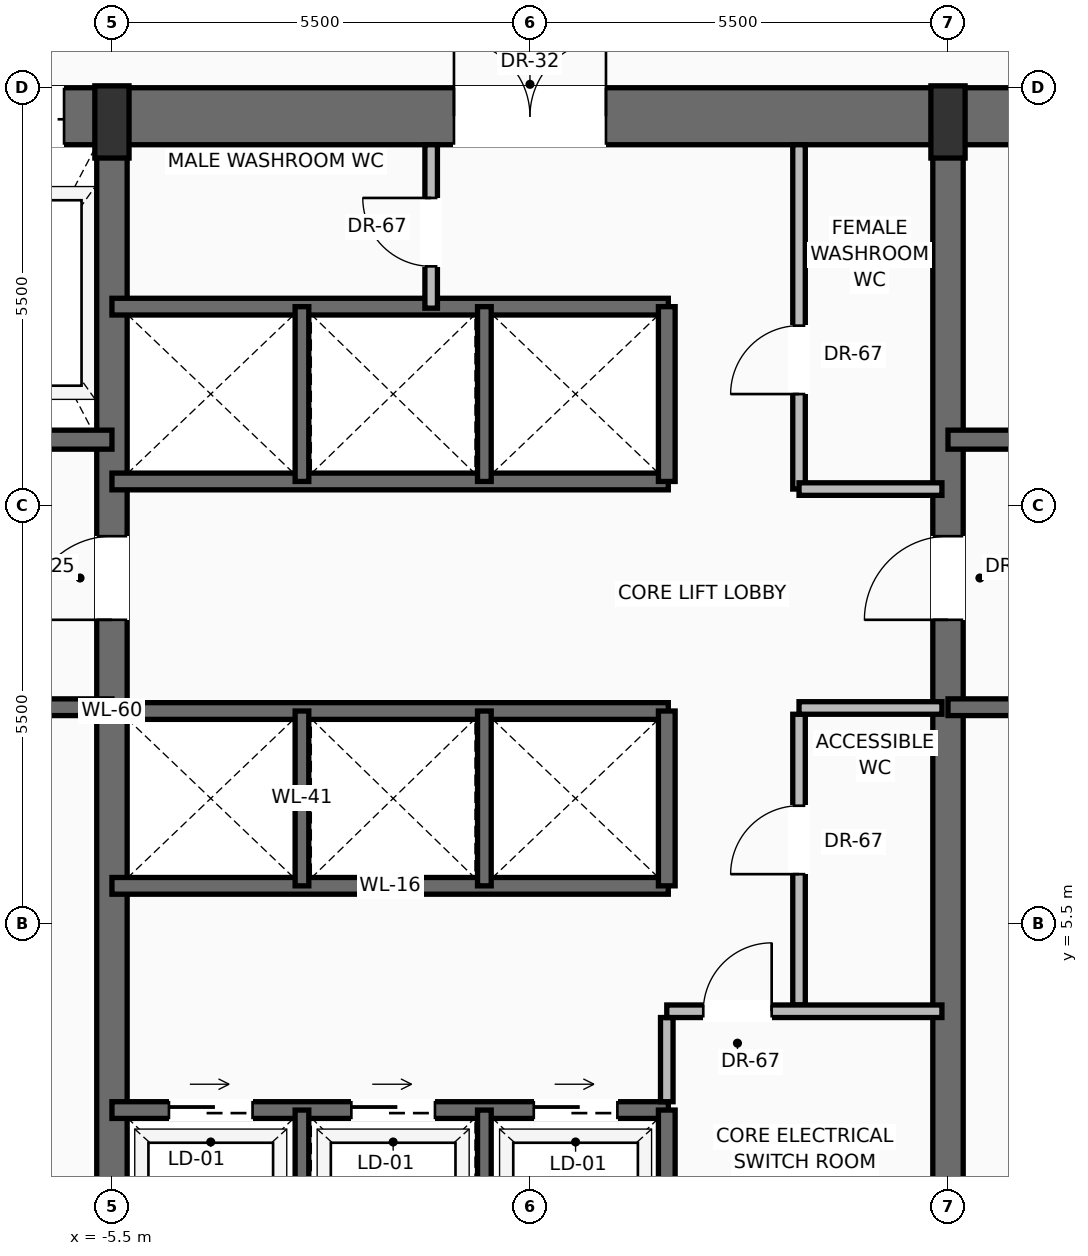
"""IFC4 building model, lengths in metres.
Left out: names, types, materials, properties, quantities, classifications, styles, units other than length and angle.
Written with IfcOpenShell. Run it as: python <this file> out.ifc"""

import sys

from ifc_helpers import new_model, si_unit, direction, frame, frame_2d, origin, origin_2d, place, context, subcontext, project, spatial, rectangle, extrude, source, transform, mapped, element, fill, save


model = new_model("IFC4")
c1 = context("Model", 3, precision=1e-05, world=origin(), true_north=direction((0.0, 1.0)))
c2 = subcontext(c1, "Body", "Model", "MODEL_VIEW")
j1 = project(units=[si_unit("LENGTHUNIT", "METRE"), si_unit("PLANEANGLEUNIT", "RADIAN")], contexts=[c1])
p1 = place(None, origin())
s1 = spatial("IfcSite", under=j1, at=p1, CompositionType="ELEMENT")
p2 = place(p1, origin())
s2 = spatial("IfcBuilding", under=s1, at=p2, CompositionType="ELEMENT")
p3 = place(p2, frame((0.0, 0.0, 95.1)))
s3 = spatial("IfcBuildingStorey", under=s2, at=p3, CompositionType="ELEMENT", Elevation=95.1)
p4 = place(p3, frame((-10.9, 16.125, 0.0), z_axis=(0.0, 0.0, 1.0), x_axis=(1.0, 0.0, 0.0)))
e1 = element("IfcWall", 1, at=p4, inside=s3, PredefinedType="SHEAR", context=c2, shape_type="SweptSolid", body=[
    extrude(rectangle(XDim=21.8, YDim=0.75, at=frame_2d((10.9, 0.0))), origin(), (0.0, 0.0, 1.0), 3.45),
])
p5 = place(p4, frame((3.47, 0.0, 0.0)))
e2 = element("IfcOpeningElement", 2, at=p5, cuts=e1, PredefinedType="OPENING", context=c2, shape_type="SweptSolid", body=[
    extrude(rectangle(XDim=1.3, YDim=2.3, at=frame_2d((0.65, 1.15))), frame((0.0, 0.385, 0.0), z_axis=(0.0, -1.0, 0.0), x_axis=(1.0, 0.0, 0.0)), (0.0, 0.0, 1.0), 0.77),
])
p6 = place(p4, frame((9.9, 0.0, 0.0)))
e3 = element("IfcOpeningElement", 3, at=p6, cuts=e1, PredefinedType="OPENING", context=c2, shape_type="SweptSolid", body=[
    extrude(rectangle(XDim=2.0, YDim=2.4, at=frame_2d((1.0, 1.2))), frame((0.0, 0.385, 0.0), z_axis=(0.0, -1.0, 0.0), x_axis=(1.0, 0.0, 0.0)), (0.0, 0.0, 1.0), 0.77),
])
p7 = place(p3, frame((-5.5, 0.475, 0.0), z_axis=(0.0, 0.0, 1.0), x_axis=(0.0, 1.0, 0.0)))
e4 = element("IfcWall", 4, at=p7, inside=s3, PredefinedType="SHEAR", context=c2, shape_type="SweptSolid", body=[
    extrude(rectangle(XDim=15.65, YDim=0.4, at=frame_2d((7.825, 0.0))), origin(), (0.0, 0.0, 1.0), 3.45),
])
p8 = place(p7, frame((9.025, 0.0, 0.0)))
e5 = element("IfcOpeningElement", 5, at=p8, cuts=e4, PredefinedType="OPENING", context=c2, shape_type="SweptSolid", body=[
    extrude(rectangle(XDim=1.1, YDim=2.2, at=frame_2d((0.55, 1.1))), frame((0.0, 0.21, 0.0), z_axis=(0.0, -1.0, 0.0), x_axis=(1.0, 0.0, 0.0)), (0.0, 0.0, 1.0), 0.42),
])
p9 = place(p3, frame((5.5, 0.475, 0.0), z_axis=(0.0, 0.0, 1.0), x_axis=(0.0, 1.0, 0.0)))
e6 = element("IfcWall", 6, at=p9, inside=s3, PredefinedType="SHEAR", context=c2, shape_type="SweptSolid", body=[
    extrude(rectangle(XDim=15.65, YDim=0.4, at=frame_2d((7.825, 0.0))), origin(), (0.0, 0.0, 1.0), 3.45),
])
p10 = place(p9, frame((9.025, 0.0, 0.0)))
e7 = element("IfcOpeningElement", 7, at=p10, cuts=e6, PredefinedType="OPENING", context=c2, shape_type="SweptSolid", body=[
    extrude(rectangle(XDim=1.1, YDim=2.2, at=frame_2d((0.55, 1.1))), frame((0.0, 0.21, 0.0), z_axis=(0.0, -1.0, 0.0), x_axis=(1.0, 0.0, 0.0)), (0.0, 0.0, 1.0), 0.42),
])
m1 = source(origin(), c2, "Body", "SweptSolid", [
    extrude(rectangle(XDim=0.45, YDim=0.95, at=origin_2d()), origin(), (0.0, 0.0, 1.0), 3.7),
])
for number, where, z_axis, x_axis in (
    (8, (-5.5, 16.05, 0.0), (0.0, 0.0, 1.0), (1.0, 0.0, 0.0)),
    (9, (5.5, 16.05, 0.0), (0.0, 0.0, 1.0), (1.0, 0.0, 0.0)),
):
    element("IfcColumn", number, at=place(p3, frame(where, z_axis=z_axis, x_axis=x_axis)), inside=s3, PredefinedType="PILASTER", context=c2, shape_type="MappedRepresentation", body=[
        mapped(m1, transform((0.0, 0.0, 0.0), scale=1.0)),
    ])
p11 = place(p3, frame((-5.5, 8.35, 0.0), z_axis=(0.0, 0.0, 1.0), x_axis=(-1.0, 0.0, 0.0)))
e10 = element("IfcWall", 10, at=p11, inside=s3, PredefinedType="SOLIDWALL", context=c2, shape_type="SweptSolid", body=[
    extrude(rectangle(XDim=4.65, YDim=0.22, at=frame_2d((2.325, 0.0))), origin(), (0.0, 0.0, 1.0), 3.45),
])
p12 = place(p11, frame((2.5, 0.0, 0.0)))
e11 = element("IfcOpeningElement", 11, at=p12, cuts=e10, PredefinedType="OPENING", context=c2, shape_type="SweptSolid", body=[
    extrude(rectangle(XDim=1.15, YDim=2.2, at=frame_2d((0.575, 1.1))), frame((0.0, 0.12, 0.0), z_axis=(0.0, -1.0, 0.0), x_axis=(1.0, 0.0, 0.0)), (0.0, 0.0, 1.0), 0.24),
])
p13 = place(p3, frame((-5.5, 11.87, 0.0), z_axis=(0.0, 0.0, 1.0), x_axis=(-1.0, 0.0, 0.0)))
e12 = element("IfcWall", 12, at=p13, inside=s3, PredefinedType="SOLIDWALL", context=c2, shape_type="SweptSolid", body=[
    extrude(rectangle(XDim=4.65, YDim=0.25, at=frame_2d((2.325, 0.0))), origin(), (0.0, 0.0, 1.0), 3.45),
])
p14 = place(p13, frame((2.95, 0.0, 0.0)))
e13 = element("IfcOpeningElement", 13, at=p14, cuts=e12, PredefinedType="OPENING", context=c2, shape_type="SweptSolid", body=[
    extrude(rectangle(XDim=1.2, YDim=2.25, at=frame_2d((0.6, 1.125))), frame((0.0, 0.135, 0.0), z_axis=(0.0, -1.0, 0.0), x_axis=(1.0, 0.0, 0.0)), (0.0, 0.0, 1.0), 0.27),
])
p15 = place(p3, frame((10.15, 8.35, 0.0), z_axis=(0.0, 0.0, 1.0), x_axis=(-1.0, 0.0, 0.0)))
e14 = element("IfcWall", 14, at=p15, inside=s3, PredefinedType="SOLIDWALL", context=c2, shape_type="SweptSolid", body=[
    extrude(rectangle(XDim=4.65, YDim=0.22, at=frame_2d((2.325, 0.0))), origin(), (0.0, 0.0, 1.0), 3.45),
])
p16 = place(p15, frame((1.0, 0.0, 0.0)))
e15 = element("IfcOpeningElement", 15, at=p16, cuts=e14, PredefinedType="OPENING", context=c2, shape_type="SweptSolid", body=[
    extrude(rectangle(XDim=1.15, YDim=2.2, at=frame_2d((0.575, 1.1))), frame((0.0, 0.12, 0.0), z_axis=(0.0, -1.0, 0.0), x_axis=(1.0, 0.0, 0.0)), (0.0, 0.0, 1.0), 0.24),
])
p17 = place(p3, frame((10.15, 11.87, 0.0), z_axis=(0.0, 0.0, 1.0), x_axis=(-1.0, 0.0, 0.0)))
e16 = element("IfcWall", 16, at=p17, inside=s3, PredefinedType="SOLIDWALL", context=c2, shape_type="SweptSolid", body=[
    extrude(rectangle(XDim=4.65, YDim=0.25, at=frame_2d((2.325, 0.0))), origin(), (0.0, 0.0, 1.0), 3.45),
])
p18 = place(p17, frame((0.5, 0.0, 0.0)))
e17 = element("IfcOpeningElement", 17, at=p18, cuts=e16, PredefinedType="OPENING", context=c2, shape_type="SweptSolid", body=[
    extrude(rectangle(XDim=1.2, YDim=2.25, at=frame_2d((0.6, 1.125))), frame((0.0, 0.135, 0.0), z_axis=(0.0, -1.0, 0.0), x_axis=(1.0, 0.0, 0.0)), (0.0, 0.0, 1.0), 0.27),
])
p19 = place(p3, frame((-5.5, 3.05, 0.0), z_axis=(0.0, 0.0, 1.0), x_axis=(1.0, 0.0, 0.0)))
e18 = element("IfcWall", 18, at=p19, inside=s3, PredefinedType="SOLIDWALL", context=c2, shape_type="SweptSolid", body=[
    extrude(rectangle(XDim=7.32, YDim=0.22, at=frame_2d((3.66, 0.0))), origin(), (0.0, 0.0, 1.0), 3.45),
])
p20 = place(p19, frame((0.75, 0.0, 0.0)))
e19 = element("IfcOpeningElement", 19, at=p20, cuts=e18, PredefinedType="OPENING", context=c2, shape_type="SweptSolid", body=[
    extrude(rectangle(XDim=1.1, YDim=2.2, at=frame_2d((0.55, 1.1))), frame((0.0, 0.12, 0.0), z_axis=(0.0, -1.0, 0.0), x_axis=(1.0, 0.0, 0.0)), (0.0, 0.0, 1.0), 0.24),
])
p21 = place(p19, frame((3.15, 0.0, 0.0)))
e20 = element("IfcOpeningElement", 20, at=p21, cuts=e18, PredefinedType="OPENING", context=c2, shape_type="SweptSolid", body=[
    extrude(rectangle(XDim=1.1, YDim=2.2, at=frame_2d((0.55, 1.1))), frame((0.0, 0.12, 0.0), z_axis=(0.0, -1.0, 0.0), x_axis=(1.0, 0.0, 0.0)), (0.0, 0.0, 1.0), 0.24),
])
p22 = place(p19, frame((5.55, 0.0, 0.0)))
e21 = element("IfcOpeningElement", 21, at=p22, cuts=e18, PredefinedType="OPENING", context=c2, shape_type="SweptSolid", body=[
    extrude(rectangle(XDim=1.1, YDim=2.2, at=frame_2d((0.55, 1.1))), frame((0.0, 0.12, 0.0), z_axis=(0.0, -1.0, 0.0), x_axis=(1.0, 0.0, 0.0)), (0.0, 0.0, 1.0), 0.24),
])
p23 = place(p3, frame((1.8, 0.85, 0.0), z_axis=(0.0, 0.0, 1.0), x_axis=(0.0, 1.0, 0.0)))
e22 = element("IfcWall", 22, at=p23, inside=s3, PredefinedType="SOLIDWALL", context=c2, shape_type="SweptSolid", body=[
    extrude(rectangle(XDim=2.2, YDim=0.22, at=frame_2d((1.1, 0.0))), origin(), (0.0, 0.0, 1.0), 3.45),
])
for number, where, z_axis, x_axis in (
    (23, (-3.0, 0.85, 0.0), (0.0, 0.0, 1.0), (0.0, 1.0, 0.0)),
    (24, (-0.6, 0.85, 0.0), (0.0, 0.0, 1.0), (0.0, 1.0, 0.0)),
):
    element("IfcWall", number, at=place(p3, frame(where, z_axis=z_axis, x_axis=x_axis)), inside=s3, PredefinedType="SOLIDWALL", context=c2, shape_type="SweptSolid", body=[
        extrude(rectangle(XDim=2.2, YDim=0.18, at=frame_2d((1.1, 0.0))), origin(), (0.0, 0.0, 1.0), 3.45),
    ])
p24 = place(p3, frame((1.8, 3.16, 0.0), z_axis=(0.0, 0.0, 1.0), x_axis=(0.0, 1.0, 0.0)))
e25 = element("IfcWall", 25, at=p24, inside=s3, PredefinedType="PARTITIONING", context=c2, shape_type="SweptSolid", body=[
    extrude(rectangle(XDim=1.108, YDim=0.165, at=frame_2d((0.554, 0.0))), origin(), (0.0, 0.0, 1.0), 3.442),
])
p25 = place(p3, frame((3.54, 4.433, 0.0), z_axis=(0.0, 0.0, 1.0), x_axis=(0.0, 1.0, 0.0)))
e26 = element("IfcWall", 26, at=p25, inside=s3, PredefinedType="PARTITIONING", context=c2, shape_type="SweptSolid", body=[
    extrude(rectangle(XDim=3.825, YDim=0.165, at=frame_2d((1.913, 0.0))), origin(), (0.0, 0.0, 1.0), 3.442),
])
p26 = place(p25, frame((1.721, 0.0, 0.0)))
e27 = element("IfcOpeningElement", 27, at=p26, cuts=e26, PredefinedType="OPENING", context=c2, shape_type="SweptSolid", body=[
    extrude(rectangle(XDim=0.9, YDim=2.1, at=frame_2d((0.45, 1.05))), frame((0.0, 0.093, 0.0), z_axis=(0.0, -1.0, 0.0), x_axis=(1.0, 0.0, 0.0)), (0.0, 0.0, 1.0), 0.185),
])
p27 = place(p3, frame((3.54, 8.34, 0.0), z_axis=(0.0, 0.0, 1.0), x_axis=(1.0, 0.0, 0.0)))
e28 = element("IfcWall", 28, at=p27, inside=s3, PredefinedType="PARTITIONING", context=c2, shape_type="SweptSolid", body=[
    extrude(rectangle(XDim=1.88, YDim=0.165, at=frame_2d((0.94, 0.0))), origin(), (0.0, 0.0, 1.0), 3.442),
])
p28 = place(p3, frame((1.8, 4.35, 0.0), z_axis=(0.0, 0.0, 1.0), x_axis=(1.0, 0.0, 0.0)))
e29 = element("IfcWall", 29, at=p28, inside=s3, PredefinedType="PARTITIONING", context=c2, shape_type="SweptSolid", body=[
    extrude(rectangle(XDim=3.62, YDim=0.165, at=frame_2d((1.81, 0.0))), origin(), (0.0, 0.0, 1.0), 3.442),
])
p29 = place(p28, frame((0.48, 0.0, 0.0)))
e30 = element("IfcOpeningElement", 30, at=p29, cuts=e29, PredefinedType="OPENING", context=c2, shape_type="SweptSolid", body=[
    extrude(rectangle(XDim=0.9, YDim=2.1, at=frame_2d((0.45, 1.05))), frame((0.0, 0.093, 0.0), z_axis=(0.0, -1.0, 0.0), x_axis=(1.0, 0.0, 0.0)), (0.0, 0.0, 1.0), 0.185),
])
for number, where, z_axis, x_axis in (
    (31, (-5.5, 6.0, 0.0), (0.0, 0.0, 1.0), (1.0, 0.0, 0.0)),
    (32, (-5.5, 8.3, 0.0), (0.0, 0.0, 1.0), (1.0, 0.0, 0.0)),
):
    element("IfcWall", number, at=place(p3, frame(where, z_axis=z_axis, x_axis=x_axis)), inside=s3, PredefinedType="SOLIDWALL", context=c2, shape_type="SweptSolid", body=[
        extrude(rectangle(XDim=7.32, YDim=0.22, at=frame_2d((3.66, 0.0))), origin(), (0.0, 0.0, 1.0), 3.45),
    ])
p30 = place(p3, frame((1.8, 6.0, 0.0), z_axis=(0.0, 0.0, 1.0), x_axis=(0.0, 1.0, 0.0)))
e33 = element("IfcWall", 33, at=p30, inside=s3, PredefinedType="SOLIDWALL", context=c2, shape_type="SweptSolid", body=[
    extrude(rectangle(XDim=2.3, YDim=0.22, at=frame_2d((1.15, 0.0))), origin(), (0.0, 0.0, 1.0), 3.45),
])
for number, where, z_axis, x_axis in (
    (34, (-3.0, 6.0, 0.0), (0.0, 0.0, 1.0), (0.0, 1.0, 0.0)),
    (35, (-0.6, 6.0, 0.0), (0.0, 0.0, 1.0), (0.0, 1.0, 0.0)),
):
    element("IfcWall", number, at=place(p3, frame(where, z_axis=z_axis, x_axis=x_axis)), inside=s3, PredefinedType="SOLIDWALL", context=c2, shape_type="SweptSolid", body=[
        extrude(rectangle(XDim=2.3, YDim=0.18, at=frame_2d((1.15, 0.0))), origin(), (0.0, 0.0, 1.0), 3.45),
    ])
for number, where, z_axis, x_axis in (
    (36, (-5.5, 11.32, 0.0), (0.0, 0.0, 1.0), (1.0, 0.0, 0.0)),
    (37, (-5.5, 13.62, 0.0), (0.0, 0.0, 1.0), (1.0, 0.0, 0.0)),
):
    element("IfcWall", number, at=place(p3, frame(where, z_axis=z_axis, x_axis=x_axis)), inside=s3, PredefinedType="SOLIDWALL", context=c2, shape_type="SweptSolid", body=[
        extrude(rectangle(XDim=7.32, YDim=0.22, at=frame_2d((3.66, 0.0))), origin(), (0.0, 0.0, 1.0), 3.45),
    ])
p31 = place(p3, frame((1.8, 11.32, 0.0), z_axis=(0.0, 0.0, 1.0), x_axis=(0.0, 1.0, 0.0)))
e38 = element("IfcWall", 38, at=p31, inside=s3, PredefinedType="SOLIDWALL", context=c2, shape_type="SweptSolid", body=[
    extrude(rectangle(XDim=2.3, YDim=0.22, at=frame_2d((1.15, 0.0))), origin(), (0.0, 0.0, 1.0), 3.45),
])
for number, where, z_axis, x_axis in (
    (39, (-3.0, 11.32, 0.0), (0.0, 0.0, 1.0), (0.0, 1.0, 0.0)),
    (40, (-0.6, 11.32, 0.0), (0.0, 0.0, 1.0), (0.0, 1.0, 0.0)),
):
    element("IfcWall", number, at=place(p3, frame(where, z_axis=z_axis, x_axis=x_axis)), inside=s3, PredefinedType="SOLIDWALL", context=c2, shape_type="SweptSolid", body=[
        extrude(rectangle(XDim=2.3, YDim=0.18, at=frame_2d((1.15, 0.0))), origin(), (0.0, 0.0, 1.0), 3.45),
    ])
p32 = place(p3, frame((-1.3, 13.6, 0.0), z_axis=(0.0, 0.0, 1.0), x_axis=(0.0, 1.0, 0.0)))
e41 = element("IfcWall", 41, at=p32, inside=s3, PredefinedType="PARTITIONING", context=c2, shape_type="SweptSolid", body=[
    extrude(rectangle(XDim=2.15, YDim=0.165, at=frame_2d((1.075, 0.0))), origin(), (0.0, 0.0, 1.0), 3.442),
])
p33 = place(p32, frame((0.55, 0.0, 0.0)))
e42 = element("IfcOpeningElement", 42, at=p33, cuts=e41, PredefinedType="OPENING", context=c2, shape_type="SweptSolid", body=[
    extrude(rectangle(XDim=0.9, YDim=2.1, at=frame_2d((0.45, 1.05))), frame((0.0, 0.093, 0.0), z_axis=(0.0, -1.0, 0.0), x_axis=(1.0, 0.0, 0.0)), (0.0, 0.0, 1.0), 0.185),
])
p34 = place(p3, frame((3.54, 11.22, 0.0), z_axis=(0.0, 0.0, 1.0), x_axis=(0.0, 1.0, 0.0)))
e43 = element("IfcWall", 43, at=p34, inside=s3, PredefinedType="PARTITIONING", context=c2, shape_type="SweptSolid", body=[
    extrude(rectangle(XDim=4.53, YDim=0.165, at=frame_2d((2.265, 0.0))), origin(), (0.0, 0.0, 1.0), 3.442),
])
p35 = place(p34, frame((1.25, 0.0, 0.0)))
e44 = element("IfcOpeningElement", 44, at=p35, cuts=e43, PredefinedType="OPENING", context=c2, shape_type="SweptSolid", body=[
    extrude(rectangle(XDim=0.9, YDim=2.1, at=frame_2d((0.45, 1.05))), frame((0.0, 0.093, 0.0), z_axis=(0.0, -1.0, 0.0), x_axis=(1.0, 0.0, 0.0)), (0.0, 0.0, 1.0), 0.185),
])
p36 = place(p3, frame((3.54, 11.22, 0.0), z_axis=(0.0, 0.0, 1.0), x_axis=(1.0, 0.0, 0.0)))
e45 = element("IfcWall", 45, at=p36, inside=s3, PredefinedType="PARTITIONING", context=c2, shape_type="SweptSolid", body=[
    extrude(rectangle(XDim=1.88, YDim=0.165, at=frame_2d((0.94, 0.0))), origin(), (0.0, 0.0, 1.0), 3.442),
])
m2 = source(origin(), c2, "Body", "SweptSolid", [
    extrude(rectangle(XDim=1.1, YDim=2.2, at=frame_2d((0.55, 1.1))), frame((0.0, 0.025, 0.0), z_axis=(0.0, -1.0, 0.0), x_axis=(1.0, 0.0, 0.0)), (0.0, 0.0, 1.0), 0.05),
])
p37 = place(p8, origin())
e46 = element("IfcDoor", 46, at=p37, inside=s3, OperationType="SINGLE_SWING_LEFT", PredefinedType="DOOR", context=c2, shape_type="MappedRepresentation", body=[
    mapped(m2, transform((0.0, 0.0, 0.0), scale=1.0)),
])
fill(e5, e46)
m3 = source(origin(), c2, "Body", "SweptSolid", [
    extrude(rectangle(XDim=1.3, YDim=2.3, at=frame_2d((0.65, 1.15))), frame((0.0, 0.025, 0.0), z_axis=(0.0, -1.0, 0.0), x_axis=(1.0, 0.0, 0.0)), (0.0, 0.0, 1.0), 0.05),
])
p38 = place(p5, origin())
e47 = element("IfcDoor", 47, at=p38, inside=s3, OperationType="SLIDING_TO_RIGHT", PredefinedType="DOOR", context=c2, shape_type="MappedRepresentation", body=[
    mapped(m3, transform((0.0, 0.0, 0.0), scale=1.0)),
])
fill(e2, e47)
p39 = place(p10, origin())
e48 = element("IfcDoor", 48, at=p39, inside=s3, OperationType="SINGLE_SWING_LEFT", PredefinedType="DOOR", context=c2, shape_type="MappedRepresentation", body=[
    mapped(m2, transform((0.0, 0.0, 0.0), scale=1.0)),
])
fill(e7, e48)
m4 = source(origin(), c2, "Body", "SweptSolid", [
    extrude(rectangle(XDim=2.0, YDim=2.4, at=frame_2d((1.0, 1.2))), frame((0.0, 0.025, 0.0), z_axis=(0.0, -1.0, 0.0), x_axis=(1.0, 0.0, 0.0)), (0.0, 0.0, 1.0), 0.05),
])
p40 = place(p6, origin())
e49 = element("IfcDoor", 49, at=p40, inside=s3, OperationType="DOUBLE_DOOR_SINGLE_SWING", PredefinedType="DOOR", context=c2, shape_type="MappedRepresentation", body=[
    mapped(m4, transform((0.0, 0.0, 0.0), scale=1.0)),
])
fill(e3, e49)
m5 = source(origin(), c2, "Body", "SweptSolid", [
    extrude(rectangle(XDim=1.1, YDim=2.2, at=frame_2d((0.55, 1.1))), frame((0.0, 0.025, 0.0), z_axis=(0.0, -1.0, 0.0), x_axis=(1.0, 0.0, 0.0)), (0.0, 0.0, 1.0), 0.05),
])
p41 = place(p20, origin())
e50 = element("IfcDoor", 50, at=p41, inside=s3, OperationType="SLIDING_TO_RIGHT", PredefinedType="DOOR", context=c2, shape_type="MappedRepresentation", body=[
    mapped(m5, transform((0.0, 0.0, 0.0), scale=1.0)),
])
fill(e19, e50)
p42 = place(p21, origin())
e51 = element("IfcDoor", 51, at=p42, inside=s3, OperationType="SLIDING_TO_RIGHT", PredefinedType="DOOR", context=c2, shape_type="MappedRepresentation", body=[
    mapped(m5, transform((0.0, 0.0, 0.0), scale=1.0)),
])
fill(e20, e51)
p43 = place(p22, origin())
e52 = element("IfcDoor", 52, at=p43, inside=s3, OperationType="SLIDING_TO_RIGHT", PredefinedType="DOOR", context=c2, shape_type="MappedRepresentation", body=[
    mapped(m5, transform((0.0, 0.0, 0.0), scale=1.0)),
])
fill(e21, e52)
m6 = source(origin(), c2, "Body", "SweptSolid", [
    extrude(rectangle(XDim=0.9, YDim=2.1, at=frame_2d((0.45, 1.05))), frame((0.0, 0.025, 0.0), z_axis=(0.0, -1.0, 0.0), x_axis=(1.0, 0.0, 0.0)), (0.0, 0.0, 1.0), 0.05),
])
p44 = place(p29, origin())
e53 = element("IfcDoor", 53, at=p44, inside=s3, OperationType="SINGLE_SWING_RIGHT", PredefinedType="DOOR", context=c2, shape_type="MappedRepresentation", body=[
    mapped(m6, transform((0.0, 0.0, 0.0), scale=1.0)),
])
fill(e30, e53)
p45 = place(p26, origin())
e54 = element("IfcDoor", 54, at=p45, inside=s3, OperationType="SINGLE_SWING_LEFT", PredefinedType="DOOR", context=c2, shape_type="MappedRepresentation", body=[
    mapped(m6, transform((0.0, 0.0, 0.0), scale=1.0)),
])
fill(e27, e54)
p46 = place(p33, origin())
e55 = element("IfcDoor", 55, at=p46, inside=s3, OperationType="SINGLE_SWING_RIGHT", PredefinedType="DOOR", context=c2, shape_type="MappedRepresentation", body=[
    mapped(m6, transform((0.0, 0.0, 0.0), scale=1.0)),
])
fill(e42, e55)
p47 = place(p35, origin())
e56 = element("IfcDoor", 56, at=p47, inside=s3, OperationType="SINGLE_SWING_LEFT", PredefinedType="DOOR", context=c2, shape_type="MappedRepresentation", body=[
    mapped(m6, transform((0.0, 0.0, 0.0), scale=1.0)),
])
fill(e44, e56)
save(model, sys.argv[1])
